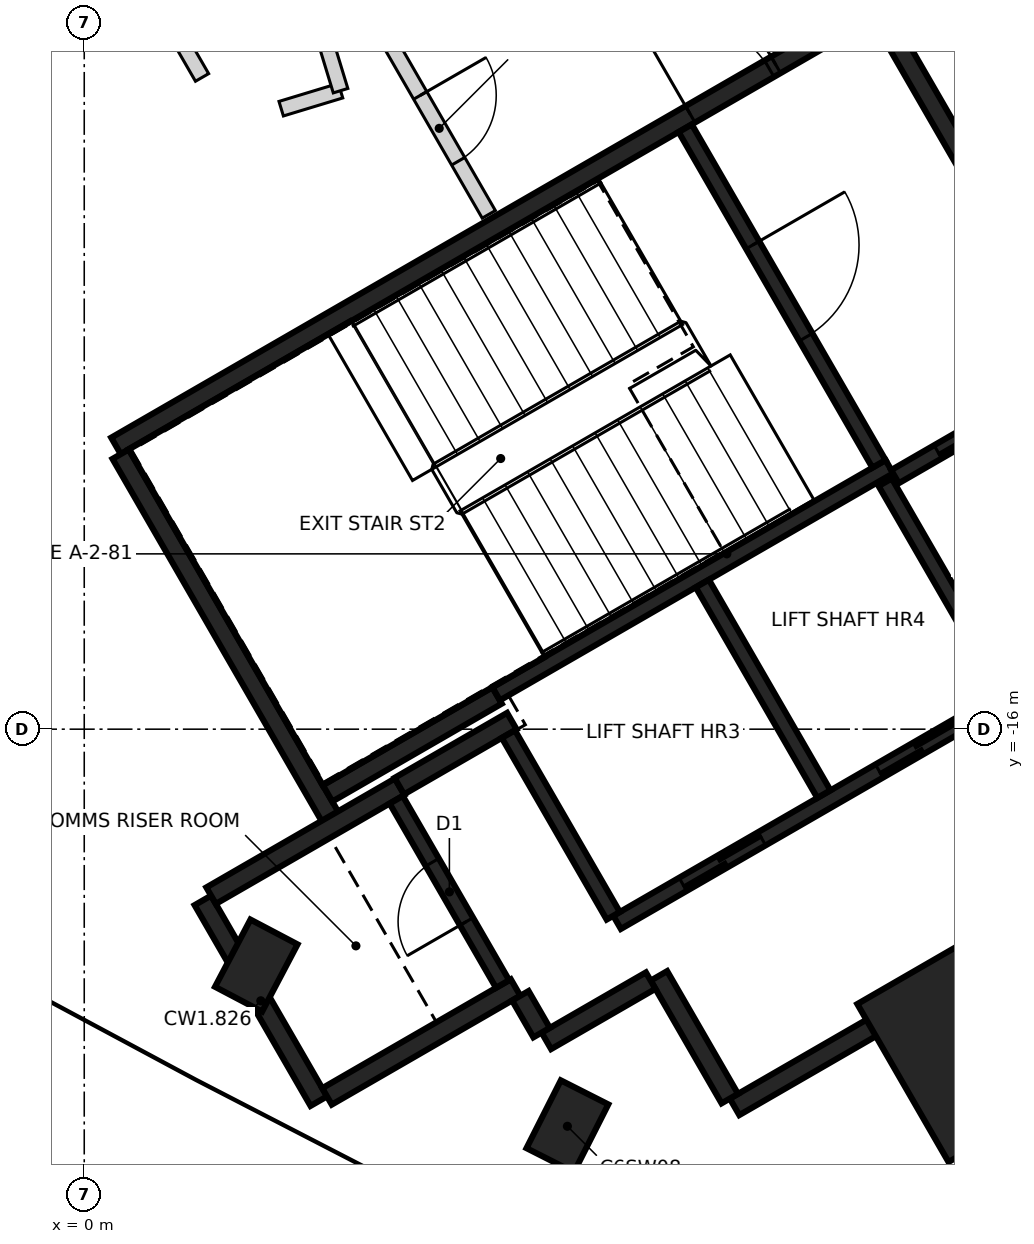
"""IFC4 building model, lengths in metres.
Left out: names, types, materials, properties, quantities, classifications, styles, units other than length and angle.
Written with IfcOpenShell. Run it as: python <this file> out.ifc"""

import sys

from ifc_helpers import new_model, si_unit, direction, frame, frame_2d, origin, origin_2d, place, context, subcontext, project, spatial, rectangle, extrude, element, fill, save


model = new_model("IFC4")
c1 = context("Model", 3, precision=1e-05, world=origin(), true_north=direction((0.0, 1.0)))
c2 = subcontext(c1, "Body", "Model", "MODEL_VIEW")
j1 = project(units=[si_unit("LENGTHUNIT", "METRE"), si_unit("PLANEANGLEUNIT", "RADIAN")], contexts=[c1])
p1 = place(None, origin())
s1 = spatial("IfcSite", under=j1, at=p1, CompositionType="ELEMENT")
p2 = place(p1, origin())
s2 = spatial("IfcBuilding", under=s1, at=p2, CompositionType="ELEMENT")
p3 = place(p2, frame((0.0, 0.0, 291.0)))
s3 = spatial("IfcBuildingStorey", under=s2, at=p3, CompositionType="ELEMENT", Elevation=291.0)
for number, where, z_axis, x_axis in (
    (1, (2.263, -19.11, -0.35), (0.0, 0.0, 1.0), (0.466, 0.885, 0.0)),
    (2, (6.356, -21.224, -0.35), (0.0, 0.0, 1.0), (0.452, 0.892, 0.0)),
):
    element("IfcColumn", number, at=place(p3, frame(where, z_axis=z_axis, x_axis=x_axis)), inside=s3, PredefinedType="COLUMN", context=c2, shape_type="SweptSolid", body=[
        extrude(rectangle(XDim=1.0, YDim=0.7, at=origin_2d()), origin(), (0.0, 0.0, 1.0), 3.6),
    ])
p4 = place(p3, frame((11.637, -20.155, -0.35), z_axis=(0.0, 0.0, 1.0), x_axis=(-0.5, 0.866025403784, 0.0)))
e3 = element("IfcColumn", 3, at=p4, inside=s3, PredefinedType="COLUMN", context=c2, shape_type="SweptSolid", body=[
    extrude(rectangle(XDim=2.4, YDim=2.0, at=origin_2d()), origin(), (0.0, 0.0, 1.0), 3.6),
])
p5 = place(p3, frame((0.417, -12.273, 0.0), z_axis=(0.0, 0.0, 1.0), x_axis=(0.866021906294, 0.500006057782, 0.0)))
e4 = element("IfcWall", 4, at=p5, inside=s3, PredefinedType="SHEAR", context=c2, shape_type="SweptSolid", body=[
    extrude(rectangle(XDim=11.55, YDim=0.25, at=frame_2d((5.775, 0.0))), origin(), (0.0, 0.0, 1.0), 3.25),
])
p6 = place(p5, frame((10.025, 0.0, 0.0)))
e5 = element("IfcOpeningElement", 5, at=p6, cuts=e4, PredefinedType="OPENING", context=c2, shape_type="SweptSolid", body=[
    extrude(rectangle(XDim=1.2, YDim=2.1, at=frame_2d((0.6, 1.05))), frame((0.0, 0.135, 0.0), z_axis=(0.0, -1.0, 0.0), x_axis=(1.0, 0.0, 0.0)), (0.0, 0.0, 1.0), 0.27),
])
p7 = place(p5, frame((8.725, 0.0, 0.0)))
e6 = element("IfcOpeningElement", 6, at=p7, cuts=e4, PredefinedType="OPENING", context=c2, shape_type="SweptSolid", body=[
    extrude(rectangle(XDim=1.2, YDim=2.1, at=frame_2d((0.6, 1.05))), frame((0.0, 0.135, 0.0), z_axis=(0.0, -1.0, 0.0), x_axis=(1.0, 0.0, 0.0)), (0.0, 0.0, 1.0), 0.27),
])
p8 = place(p3, frame((16.133, -16.594, 0.0), z_axis=(0.0, 0.0, 1.0), x_axis=(-0.866022959057, -0.500004234368, 0.0)))
e7 = element("IfcWall", 7, at=p8, inside=s3, PredefinedType="SHEAR", context=c2, shape_type="SweptSolid", body=[
    extrude(rectangle(XDim=8.75, YDim=0.25, at=frame_2d((4.375, 0.0))), origin(), (0.0, 0.0, 1.0), 3.25),
])
p9 = place(p3, frame((3.235, -17.153, 0.0), z_axis=(0.0, 0.0, 1.0), x_axis=(-0.500008851346, 0.866020293397, 0.0)))
e8 = element("IfcWall", 8, at=p9, inside=s3, PredefinedType="SHEAR", context=c2, shape_type="SweptSolid", body=[
    extrude(rectangle(XDim=5.51, YDim=0.25, at=frame_2d((2.755, 0.0))), origin(), (0.0, 0.0, 1.0), 3.25),
])
p10 = place(p3, frame((10.483, -6.606, 0.0), z_axis=(0.0, 0.0, 1.0), x_axis=(0.49999885962, -0.866026062182, 0.0)))
e9 = element("IfcWall", 9, at=p10, inside=s3, PredefinedType="SHEAR", context=c2, shape_type="SweptSolid", body=[
    extrude(rectangle(XDim=5.225, YDim=0.25, at=frame_2d((2.612, 0.0))), origin(), (0.0, 0.0, 1.0), 3.25),
])
p11 = place(p3, frame((3.085, -20.894, 0.0), z_axis=(0.0, 0.0, 1.0), x_axis=(-0.499978833458, 0.866037623948, 0.0)))
e10 = element("IfcWall", 10, at=p11, inside=s3, PredefinedType="SHEAR", context=c2, shape_type="SweptSolid", body=[
    extrude(rectangle(XDim=3.05, YDim=0.25, at=frame_2d((1.525, 0.0))), origin(), (0.0, 0.0, 1.0), 3.25),
])
p12 = place(p3, frame((1.669, -18.19, 0.0), z_axis=(0.0, 0.0, 1.0), x_axis=(0.866042235819, 0.499970844928, 0.0)))
e11 = element("IfcWall", 11, at=p12, inside=s3, PredefinedType="SHEAR", context=c2, shape_type="SweptSolid", body=[
    extrude(rectangle(XDim=2.865, YDim=0.25, at=frame_2d((1.432, 0.0))), origin(), (0.0, 0.0, 1.0), 3.25),
])
p13 = place(p3, frame((5.675, -19.399, 0.0), z_axis=(0.0, 0.0, 1.0), x_axis=(-0.866026637627, -0.499997862916, 0.0)))
e12 = element("IfcWall", 12, at=p13, inside=s3, PredefinedType="SHEAR", context=c2, shape_type="SweptSolid", body=[
    extrude(rectangle(XDim=2.865, YDim=0.25, at=frame_2d((1.432, 0.0))), origin(), (0.0, 0.0, 1.0), 3.25),
])
p14 = place(p3, frame((5.431, -15.556, 0.0), z_axis=(0.0, 0.0, 1.0), x_axis=(-0.866022940537, -0.500004266446, 0.0)))
e13 = element("IfcWall", 13, at=p14, inside=s3, PredefinedType="SHEAR", context=c2, shape_type="SweptSolid", body=[
    extrude(rectangle(XDim=2.575, YDim=0.25, at=frame_2d((1.287, 0.0))), origin(), (0.0, 0.0, 1.0), 3.25),
])
p15 = place(p3, frame((8.493, -20.86, 0.0), z_axis=(0.0, 0.0, 1.0), x_axis=(-0.500039802285, 0.866002422705, 0.0)))
e14 = element("IfcWall", 14, at=p15, inside=s3, PredefinedType="SHEAR", context=c2, shape_type="SweptSolid", body=[
    extrude(rectangle(XDim=1.865, YDim=0.25, at=frame_2d((0.932, 0.0))), origin(), (0.0, 0.0, 1.0), 3.25),
])
p16 = place(p3, frame((4.145, -16.749, 0.0), z_axis=(0.0, 0.0, 1.0), x_axis=(0.866038183914, 0.499977863513, 0.0)))
e15 = element("IfcWall", 15, at=p16, inside=s3, PredefinedType="SHEAR", context=c2, shape_type="SweptSolid", body=[
    extrude(rectangle(XDim=1.71, YDim=0.25, at=frame_2d((0.855, 0.0))), origin(), (0.0, 0.0, 1.0), 3.25),
])
p17 = place(p3, frame((7.452, -19.308, 0.0), z_axis=(0.0, 0.0, 1.0), x_axis=(-0.866044474677, -0.49996696679, 0.0)))
e16 = element("IfcWall", 16, at=p17, inside=s3, PredefinedType="SHEAR", context=c2, shape_type="SweptSolid", body=[
    extrude(rectangle(XDim=1.584, YDim=0.25, at=frame_2d((0.792, 0.0))), origin(), (0.0, 0.0, 1.0), 3.25),
])
p18 = place(p3, frame((6.017, -19.992, 0.0), z_axis=(0.0, 0.0, 1.0), x_axis=(-0.500364886717, 0.865814633822, 0.0)))
e17 = element("IfcWall", 17, at=p18, inside=s3, PredefinedType="SHEAR", context=c2, shape_type="SweptSolid", body=[
    extrude(rectangle(XDim=0.559, YDim=0.25, at=frame_2d((0.28, 0.0))), origin(), (0.0, 0.0, 1.0), 3.25),
])
p19 = place(p3, frame((5.419, -15.534, 0.0), z_axis=(0.0, 0.0, 1.0), x_axis=(0.866029065029, 0.499993658486, 0.0)))
e18 = element("IfcWall", 18, at=p19, inside=s3, PredefinedType="SHEAR", context=c2, shape_type="SweptSolid", body=[
    extrude(rectangle(XDim=5.974, YDim=0.2, at=frame_2d((2.987, 0.0))), origin(), (0.0, 0.0, 1.0), 3.25),
])
p20 = place(p3, frame((7.01, -18.542, 0.0), z_axis=(0.0, 0.0, 1.0), x_axis=(0.866030299012, 0.499991521122, 0.0)))
e19 = element("IfcWall", 19, at=p20, inside=s3, PredefinedType="SHEAR", context=c2, shape_type="SweptSolid", body=[
    extrude(rectangle(XDim=6.1, YDim=0.2, at=frame_2d((3.05, 0.0))), origin(), (0.0, 0.0, 1.0), 3.25),
])
p21 = place(p20, frame((1.0, 0.0, 0.0)))
e20 = element("IfcOpeningElement", 20, at=p21, cuts=e19, PredefinedType="OPENING", context=c2, shape_type="SweptSolid", body=[
    extrude(rectangle(XDim=1.2, YDim=2.1, at=frame_2d((0.6, 1.05))), frame((0.0, 0.11, 0.0), z_axis=(0.0, -1.0, 0.0), x_axis=(1.0, 0.0, 0.0)), (0.0, 0.0, 1.0), 0.22),
])
p22 = place(p20, frame((3.982, 0.0, 0.0)))
e21 = element("IfcOpeningElement", 21, at=p22, cuts=e19, PredefinedType="OPENING", context=c2, shape_type="SweptSolid", body=[
    extrude(rectangle(XDim=1.2, YDim=2.1, at=frame_2d((0.6, 1.05))), frame((0.0, 0.11, 0.0), z_axis=(0.0, -1.0, 0.0), x_axis=(1.0, 0.0, 0.0)), (0.0, 0.0, 1.0), 0.22),
])
p23 = place(p3, frame((7.906, -8.094, 0.0), z_axis=(0.0, 0.0, 1.0), x_axis=(0.500027839223, -0.866009330205, 0.0)))
e22 = element("IfcWall", 22, at=p23, inside=s3, PredefinedType="SHEAR", context=c2, shape_type="SweptSolid", body=[
    extrude(rectangle(XDim=5.098, YDim=0.2, at=frame_2d((2.549, 0.0))), origin(), (0.0, 0.0, 1.0), 3.25),
])
p24 = place(p23, frame((1.774, 0.0, 0.0)))
e23 = element("IfcOpeningElement", 23, at=p24, cuts=e22, PredefinedType="OPENING", context=c2, shape_type="SweptSolid", body=[
    extrude(rectangle(XDim=1.4, YDim=2.1, at=frame_2d((0.7, 1.05))), frame((0.0, 0.11, 0.0), z_axis=(0.0, -1.0, 0.0), x_axis=(1.0, 0.0, 0.0)), (0.0, 0.0, 1.0), 0.22),
])
p25 = place(p3, frame((8.132, -14.084, 0.0), z_axis=(0.0, 0.0, 1.0), x_axis=(0.499997778408, -0.866026686418, 0.0)))
e24 = element("IfcWall", 24, at=p25, inside=s3, PredefinedType="SHEAR", context=c2, shape_type="SweptSolid", body=[
    extrude(rectangle(XDim=3.198, YDim=0.2, at=frame_2d((1.599, 0.0))), origin(), (0.0, 0.0, 1.0), 3.25),
])
p26 = place(p3, frame((5.503, -19.352, 0.0), z_axis=(0.0, 0.0, 1.0), x_axis=(-0.499986818241, 0.866033014143, 0.0)))
e25 = element("IfcWall", 25, at=p26, inside=s3, PredefinedType="SHEAR", context=c2, shape_type="SweptSolid", body=[
    extrude(rectangle(XDim=2.798, YDim=0.2, at=frame_2d((1.399, 0.0))), origin(), (0.0, 0.0, 1.0), 3.25),
])
p27 = place(p26, frame((0.949, 0.0, 0.0)))
e26 = element("IfcOpeningElement", 26, at=p27, cuts=e25, PredefinedType="OPENING", context=c2, shape_type="SweptSolid", body=[
    extrude(rectangle(XDim=0.9, YDim=2.1, at=frame_2d((0.45, 1.05))), frame((0.0, 0.11, 0.0), z_axis=(0.0, -1.0, 0.0), x_axis=(1.0, 0.0, 0.0)), (0.0, 0.0, 1.0), 0.22),
])
p28 = place(p3, frame((6.96, -18.455, 0.0), z_axis=(0.0, 0.0, 1.0), x_axis=(-0.499926705758, 0.866067716099, 0.0)))
e27 = element("IfcWall", 27, at=p28, inside=s3, PredefinedType="SHEAR", context=c2, shape_type="SweptSolid", body=[
    extrude(rectangle(XDim=2.759, YDim=0.2, at=frame_2d((1.38, 0.0))), origin(), (0.0, 0.0, 1.0), 3.25),
])
p29 = place(p3, frame((12.088, -15.437, 0.0), z_axis=(0.0, 0.0, 1.0), x_axis=(-0.500026960575, 0.86600983753, 0.0)))
e28 = element("IfcWall", 28, at=p29, inside=s3, PredefinedType="SHEAR", context=c2, shape_type="SweptSolid", body=[
    extrude(rectangle(XDim=3.1, YDim=0.2, at=frame_2d((1.55, 0.0))), origin(), (0.0, 0.0, 1.0), 3.25),
])
p30 = place(p3, frame((10.666, -12.678, 0.0), z_axis=(0.0, 0.0, 1.0), x_axis=(0.866018407898, 0.500012117035, 0.0)))
e29 = element("IfcWall", 29, at=p30, inside=s3, PredefinedType="SHEAR", context=c2, shape_type="SweptSolid", body=[
    extrude(rectangle(XDim=2.651, YDim=0.2, at=frame_2d((1.325, 0.0))), origin(), (0.0, 0.0, 1.0), 3.25),
])
p31 = place(p30, frame((0.652, 0.0, 0.0)))
e30 = element("IfcOpeningElement", 30, at=p31, cuts=e29, PredefinedType="OPENING", context=c2, shape_type="SweptSolid", body=[
    extrude(rectangle(XDim=1.3, YDim=2.1, at=frame_2d((0.65, 1.05))), frame((0.0, 0.11, 0.0), z_axis=(0.0, -1.0, 0.0), x_axis=(1.0, 0.0, 0.0)), (0.0, 0.0, 1.0), 0.22),
])
p32 = place(p3, frame((1.147, -6.728, 0.0), z_axis=(0.0, 0.0, 1.0), x_axis=(0.500080775649, -0.865978762919, 0.0)))
e31 = element("IfcWall", 31, at=p32, inside=s3, PredefinedType="PARTITIONING", context=c2, shape_type="SweptSolid", body=[
    extrude(rectangle(XDim=0.806, YDim=0.2, at=frame_2d((0.403, 0.0))), origin(), (0.0, 0.0, 1.0), 3.25),
])
p33 = place(p3, frame((2.591, -7.837, 0.0), z_axis=(0.0, 0.0, 1.0), x_axis=(0.956974070788, 0.290173444409, 0.0)))
e32 = element("IfcWall", 32, at=p33, inside=s3, PredefinedType="PARTITIONING", context=c2, shape_type="SweptSolid", body=[
    extrude(rectangle(XDim=0.816, YDim=0.2, at=frame_2d((0.408, 0.0))), origin(), (0.0, 0.0, 1.0), 3.25),
])
p34 = place(p3, frame((3.11, -6.739, 0.0), z_axis=(0.0, 0.0, 1.0), x_axis=(0.291053676179, -0.95670672496, 0.0)))
e33 = element("IfcWall", 33, at=p34, inside=s3, PredefinedType="PARTITIONING", context=c2, shape_type="SweptSolid", body=[
    extrude(rectangle(XDim=0.9, YDim=0.2, at=frame_2d((0.45, 0.0))), origin(), (0.0, 0.0, 1.0), 3.25),
])
p35 = place(p3, frame((3.987, -6.911, 0.0), z_axis=(0.0, 0.0, 1.0), x_axis=(0.499458942258, -0.866337558345, 0.0)))
e34 = element("IfcWall", 34, at=p35, inside=s3, PredefinedType="PARTITIONING", context=c2, shape_type="SweptSolid", body=[
    extrude(rectangle(XDim=2.674, YDim=0.2, at=frame_2d((1.337, 0.0))), origin(), (0.0, 0.0, 1.0), 3.25),
])
p36 = place(p35, frame((0.867, 0.0, 0.0)))
e35 = element("IfcOpeningElement", 35, at=p36, cuts=e34, PredefinedType="OPENING", context=c2, shape_type="SweptSolid", body=[
    extrude(rectangle(XDim=1.0, YDim=2.1, at=frame_2d((0.5, 1.05))), frame((0.0, 0.11, 0.0), z_axis=(0.0, -1.0, 0.0), x_axis=(1.0, 0.0, 0.0)), (0.0, 0.0, 1.0), 0.22),
])
p37 = place(p3, frame((11.163, -5.036, 0.0), z_axis=(0.0, 0.0, 1.0), x_axis=(0.516730398198, -0.856148173845, 0.0)))
e36 = element("IfcWall", 36, at=p37, inside=s3, PredefinedType="PARTITIONING", context=c2, shape_type="SweptSolid", body=[
    extrude(rectangle(XDim=6.791, YDim=0.2, at=frame_2d((3.396, 0.0))), origin(), (0.0, 0.0, 1.0), 3.25),
])
p38 = place(p31, origin())
e37 = element("IfcDoor", 37, at=p38, inside=s3, OperationType="SLIDING_TO_RIGHT", PredefinedType="DOOR", context=c2, shape_type="SweptSolid", body=[
    extrude(rectangle(XDim=1.3, YDim=2.1, at=frame_2d((0.65, 1.05))), frame((0.0, 0.025, 0.0), z_axis=(0.0, -1.0, 0.0), x_axis=(1.0, 0.0, 0.0)), (0.0, 0.0, 1.0), 0.05),
])
fill(e30, e37)
p39 = place(p21, origin())
e38 = element("IfcDoor", 38, at=p39, inside=s3, OperationType="DOUBLE_DOOR_SLIDING", PredefinedType="DOOR", context=c2, shape_type="SweptSolid", body=[
    extrude(rectangle(XDim=1.2, YDim=2.1, at=frame_2d((0.6, 1.05))), frame((0.0, 0.025, 0.0), z_axis=(0.0, -1.0, 0.0), x_axis=(1.0, 0.0, 0.0)), (0.0, 0.0, 1.0), 0.05),
])
fill(e20, e38)
p40 = place(p22, origin())
e39 = element("IfcDoor", 39, at=p40, inside=s3, OperationType="DOUBLE_DOOR_SLIDING", PredefinedType="DOOR", context=c2, shape_type="SweptSolid", body=[
    extrude(rectangle(XDim=1.2, YDim=2.1, at=frame_2d((0.6, 1.05))), frame((0.0, 0.025, 0.0), z_axis=(0.0, -1.0, 0.0), x_axis=(1.0, 0.0, 0.0)), (0.0, 0.0, 1.0), 0.05),
])
fill(e21, e39)
p41 = place(p6, origin())
e40 = element("IfcDoor", 40, at=p41, inside=s3, OperationType="SINGLE_SWING_LEFT", PredefinedType="DOOR", context=c2, shape_type="SweptSolid", body=[
    extrude(rectangle(XDim=1.2, YDim=2.1, at=frame_2d((0.6, 1.05))), frame((0.0, 0.025, 0.0), z_axis=(0.0, -1.0, 0.0), x_axis=(1.0, 0.0, 0.0)), (0.0, 0.0, 1.0), 0.05),
])
fill(e5, e40)
p42 = place(p7, origin())
e41 = element("IfcDoor", 41, at=p42, inside=s3, OperationType="SINGLE_SWING_RIGHT", PredefinedType="DOOR", context=c2, shape_type="SweptSolid", body=[
    extrude(rectangle(XDim=1.2, YDim=2.1, at=frame_2d((0.6, 1.05))), frame((0.0, 0.025, 0.0), z_axis=(0.0, -1.0, 0.0), x_axis=(1.0, 0.0, 0.0)), (0.0, 0.0, 1.0), 0.05),
])
fill(e6, e41)
p43 = place(p24, origin())
e42 = element("IfcDoor", 42, at=p43, inside=s3, OperationType="SINGLE_SWING_RIGHT", PredefinedType="DOOR", context=c2, shape_type="SweptSolid", body=[
    extrude(rectangle(XDim=1.4, YDim=2.1, at=frame_2d((0.7, 1.05))), frame((0.0, 0.025, 0.0), z_axis=(0.0, -1.0, 0.0), x_axis=(1.0, 0.0, 0.0)), (0.0, 0.0, 1.0), 0.05),
])
fill(e23, e42)
p44 = place(p27, origin())
e43 = element("IfcDoor", 43, at=p44, inside=s3, OperationType="SINGLE_SWING_LEFT", PredefinedType="DOOR", context=c2, shape_type="SweptSolid", body=[
    extrude(rectangle(XDim=0.9, YDim=2.1, at=frame_2d((0.45, 1.05))), frame((0.0, 0.025, 0.0), z_axis=(0.0, -1.0, 0.0), x_axis=(1.0, 0.0, 0.0)), (0.0, 0.0, 1.0), 0.05),
])
fill(e26, e43)
p45 = place(p36, frame((1.0, 0.0, 0.0), z_axis=(0.0, 0.0, 1.0), x_axis=(-1.0, 0.0, 0.0)))
e44 = element("IfcDoor", 44, at=p45, inside=s3, OperationType="SINGLE_SWING_LEFT", PredefinedType="DOOR", context=c2, shape_type="SweptSolid", body=[
    extrude(rectangle(XDim=1.0, YDim=2.1, at=frame_2d((0.5, 1.05))), frame((0.0, 0.025, 0.0), z_axis=(0.0, -1.0, 0.0), x_axis=(1.0, 0.0, 0.0)), (0.0, 0.0, 1.0), 0.05),
])
fill(e35, e44)
save(model, sys.argv[1])
